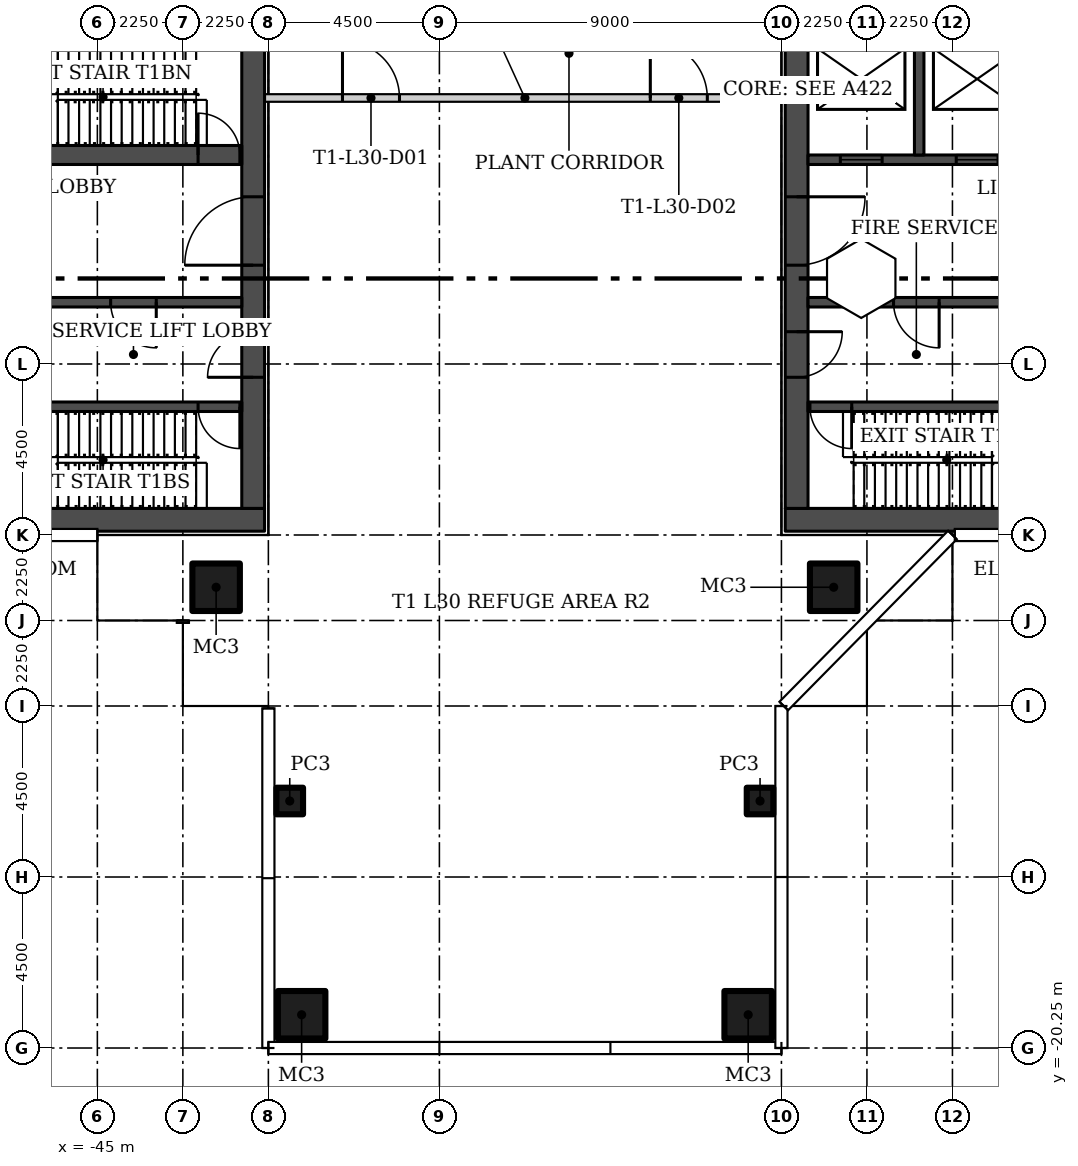
"""IFC4 building model, lengths in metres.
Left out: names, types, materials, properties, quantities, classifications, styles, units other than length and angle.
Written with IfcOpenShell. Run it as: python <this file> out.ifc"""

import sys

from ifc_helpers import new_model, si_unit, direction, frame, frame_2d, origin, origin_2d, place, context, subcontext, project, spatial, rectangle, hollow_rectangle, extrude, element, fill, save


model = new_model("IFC4")
c1 = context("Model", 3, precision=1e-05, world=origin(), true_north=direction((0.0, 1.0)))
c2 = subcontext(c1, "Body", "Model", "MODEL_VIEW")
j1 = project(units=[si_unit("LENGTHUNIT", "METRE"), si_unit("PLANEANGLEUNIT", "RADIAN")], contexts=[c1])
p1 = place(None, origin())
s1 = spatial("IfcSite", under=j1, at=p1, CompositionType="ELEMENT")
p2 = place(p1, origin())
s2 = spatial("IfcBuilding", under=s1, at=p2, CompositionType="ELEMENT")
p3 = place(p2, frame((0.0, 0.0, 128.7)))
s3 = spatial("IfcBuildingStorey", under=s2, at=p3, CompositionType="ELEMENT", Elevation=128.7)
for number, where in (
    (1, (-25.625, -8.125, 0.0)),
    (2, (-41.875, -8.125, 0.0)),
):
    element("IfcColumn", number, at=place(p3, frame(where)), inside=s3, PredefinedType="COLUMN", context=c2, shape_type="SweptSolid", body=[
        extrude(hollow_rectangle(XDim=1.25, YDim=1.25, WallThickness=0.05, at=origin_2d()), origin(), (0.0, 0.0, 1.0), 4.4),
    ])
p4 = place(p3, frame((-39.938, -13.75, 0.0)))
e3 = element("IfcColumn", 3, at=p4, inside=s3, PredefinedType="COLUMN", context=c2, shape_type="SweptSolid", body=[
    extrude(hollow_rectangle(XDim=0.7, YDim=0.7, WallThickness=0.025, at=origin_2d()), origin(), (0.0, 0.0, 1.0), 4.4),
])
p5 = place(p3, frame((-39.625, -19.375, 0.0)))
e4 = element("IfcColumn", 4, at=p5, inside=s3, PredefinedType="COLUMN", context=c2, shape_type="SweptSolid", body=[
    extrude(hollow_rectangle(XDim=1.25, YDim=1.25, WallThickness=0.05, at=origin_2d()), origin(), (0.0, 0.0, 1.0), 4.4),
])
p6 = place(p3, frame((-27.562, -13.75, 0.0)))
e5 = element("IfcColumn", 5, at=p6, inside=s3, PredefinedType="COLUMN", context=c2, shape_type="SweptSolid", body=[
    extrude(hollow_rectangle(XDim=0.7, YDim=0.7, WallThickness=0.025, at=origin_2d()), origin(), (0.0, 0.0, 1.0), 4.4),
])
p7 = place(p3, frame((-27.875, -19.375, 0.0)))
e6 = element("IfcColumn", 6, at=p7, inside=s3, PredefinedType="COLUMN", context=c2, shape_type="SweptSolid", body=[
    extrude(hollow_rectangle(XDim=1.25, YDim=1.25, WallThickness=0.05, at=origin_2d()), origin(), (0.0, 0.0, 1.0), 4.4),
])
p8 = place(p3, frame((-40.6, 4.75, 0.0)))
e7 = element("IfcWall", 7, at=p8, inside=s3, PredefinedType="PARTITIONING", context=c2, shape_type="SweptSolid", body=[
    extrude(rectangle(XDim=13.7, YDim=0.2, at=frame_2d((6.85, 0.0))), origin(), (0.0, 0.0, 1.0), 4.4),
])
p9 = place(p8, frame((2.05, 0.0, 0.0)))
e8 = element("IfcOpeningElement", 8, at=p9, cuts=e7, PredefinedType="OPENING", context=c2, shape_type="SweptSolid", body=[
    extrude(rectangle(XDim=1.5, YDim=2.4, at=frame_2d((0.75, 1.2))), frame((0.0, 0.11, 0.0), z_axis=(0.0, -1.0, 0.0), x_axis=(1.0, 0.0, 0.0)), (0.0, 0.0, 1.0), 0.22),
])
p10 = place(p8, frame((10.15, 0.0, 0.0)))
e9 = element("IfcOpeningElement", 9, at=p10, cuts=e7, PredefinedType="OPENING", context=c2, shape_type="SweptSolid", body=[
    extrude(rectangle(XDim=1.5, YDim=2.4, at=frame_2d((0.75, 1.2))), frame((0.0, 0.11, 0.0), z_axis=(0.0, -1.0, 0.0), x_axis=(1.0, 0.0, 0.0)), (0.0, 0.0, 1.0), 0.22),
])
p11 = place(p3, frame((-26.9, -6.35, 0.0)))
e10 = element("IfcWall", 10, at=p11, inside=s3, PredefinedType="SHEAR", context=c2, shape_type="SweptSolid", body=[
    extrude(rectangle(XDim=13.3, YDim=0.6, at=frame_2d((6.65, 0.0))), origin(), (0.0, 0.0, 1.0), 4.4),
])
p12 = place(p3, frame((-26.6, 6.05, 0.0), z_axis=(0.0, 0.0, 1.0), x_axis=(0.0, -1.0, 0.0)))
e11 = element("IfcWall", 11, at=p12, inside=s3, PredefinedType="SHEAR", context=c2, shape_type="SweptSolid", body=[
    extrude(rectangle(XDim=12.1, YDim=0.6, at=frame_2d((6.05, 0.0))), origin(), (0.0, 0.0, 1.0), 4.4),
])
p13 = place(p12, frame((7.45, 0.0, 0.0)))
e12 = element("IfcOpeningElement", 12, at=p13, cuts=e11, PredefinedType="OPENING", context=c2, shape_type="SweptSolid", body=[
    extrude(rectangle(XDim=1.2, YDim=2.1, at=frame_2d((0.6, 1.05))), frame((0.0, 0.31, 0.0), z_axis=(0.0, -1.0, 0.0), x_axis=(1.0, 0.0, 0.0)), (0.0, 0.0, 1.0), 0.62),
])
p14 = place(p12, frame((3.9, 0.0, 0.0)))
e13 = element("IfcOpeningElement", 13, at=p14, cuts=e11, PredefinedType="OPENING", context=c2, shape_type="SweptSolid", body=[
    extrude(rectangle(XDim=1.8, YDim=2.4, at=frame_2d((0.9, 1.2))), frame((0.0, 0.31, 0.0), z_axis=(0.0, -1.0, 0.0), x_axis=(1.0, 0.0, 0.0)), (0.0, 0.0, 1.0), 0.62),
])
p15 = place(p3, frame((-14.2, -3.375, 0.0), z_axis=(0.0, 0.0, 1.0), x_axis=(-1.0, 0.0, 0.0)))
e14 = element("IfcWall", 14, at=p15, inside=s3, PredefinedType="SHEAR", context=c2, shape_type="SweptSolid", body=[
    extrude(rectangle(XDim=12.1, YDim=0.25, at=frame_2d((6.05, 0.0))), origin(), (0.0, 0.0, 1.0), 4.4),
])
p16 = place(p15, frame((10.95, 0.0, 0.0)))
e15 = element("IfcOpeningElement", 15, at=p16, cuts=e14, PredefinedType="OPENING", context=c2, shape_type="SweptSolid", body=[
    extrude(rectangle(XDim=1.1, YDim=2.1, at=frame_2d((0.55, 1.05))), frame((0.0, 0.135, 0.0), z_axis=(0.0, -1.0, 0.0), x_axis=(1.0, 0.0, 0.0)), (0.0, 0.0, 1.0), 0.27),
])
p17 = place(p3, frame((-14.2, -0.625, 0.0), z_axis=(0.0, 0.0, 1.0), x_axis=(-1.0, 0.0, 0.0)))
e16 = element("IfcWall", 16, at=p17, inside=s3, PredefinedType="SHEAR", context=c2, shape_type="SweptSolid", body=[
    extrude(rectangle(XDim=12.1, YDim=0.25, at=frame_2d((6.05, 0.0))), origin(), (0.0, 0.0, 1.0), 4.4),
])
p18 = place(p17, frame((8.65, 0.0, 0.0)))
e17 = element("IfcOpeningElement", 17, at=p18, cuts=e16, PredefinedType="OPENING", context=c2, shape_type="SweptSolid", body=[
    extrude(rectangle(XDim=1.2, YDim=2.1, at=frame_2d((0.6, 1.05))), frame((0.0, 0.135, 0.0), z_axis=(0.0, -1.0, 0.0), x_axis=(1.0, 0.0, 0.0)), (0.0, 0.0, 1.0), 0.27),
])
p19 = place(p17, frame((2.0, 0.0, 0.0)))
e18 = element("IfcOpeningElement", 18, at=p19, cuts=e16, PredefinedType="OPENING", context=c2, shape_type="SweptSolid", body=[
    extrude(rectangle(XDim=0.9, YDim=2.1, at=frame_2d((0.45, 1.05))), frame((0.0, 0.135, 0.0), z_axis=(0.0, -1.0, 0.0), x_axis=(1.0, 0.0, 0.0)), (0.0, 0.0, 1.0), 0.27),
])
p20 = place(p17, frame((0.375, 0.0, 0.0)))
e19 = element("IfcOpeningElement", 19, at=p20, cuts=e16, PredefinedType="OPENING", context=c2, shape_type="SweptSolid", body=[
    extrude(rectangle(XDim=0.9, YDim=2.1, at=frame_2d((0.45, 1.05))), frame((0.0, 0.135, 0.0), z_axis=(0.0, -1.0, 0.0), x_axis=(1.0, 0.0, 0.0)), (0.0, 0.0, 1.0), 0.27),
])
p21 = place(p3, frame((-26.3, 3.125, 0.0)))
e20 = element("IfcWall", 20, at=p21, inside=s3, PredefinedType="SHEAR", context=c2, shape_type="SweptSolid", body=[
    extrude(rectangle(XDim=12.1, YDim=0.25, at=frame_2d((6.05, 0.0))), origin(), (0.0, 0.0, 1.0), 4.4),
])
p22 = place(p21, frame((0.85, 0.0, 0.0)))
e21 = element("IfcOpeningElement", 21, at=p22, cuts=e20, PredefinedType="OPENING", context=c2, shape_type="SweptSolid", body=[
    extrude(rectangle(XDim=1.1, YDim=2.1, at=frame_2d((0.55, 1.05))), frame((0.0, 0.135, 0.0), z_axis=(0.0, -1.0, 0.0), x_axis=(1.0, 0.0, 0.0)), (0.0, 0.0, 1.0), 0.27),
])
p23 = place(p21, frame((3.9, 0.0, 0.0)))
e22 = element("IfcOpeningElement", 22, at=p23, cuts=e20, PredefinedType="OPENING", context=c2, shape_type="SweptSolid", body=[
    extrude(rectangle(XDim=1.1, YDim=2.1, at=frame_2d((0.55, 1.05))), frame((0.0, 0.135, 0.0), z_axis=(0.0, -1.0, 0.0), x_axis=(1.0, 0.0, 0.0)), (0.0, 0.0, 1.0), 0.27),
])
p24 = place(p3, frame((-23.375, 3.25, 0.0), z_axis=(0.0, 0.0, 1.0), x_axis=(0.0, 1.0, 0.0)))
e23 = element("IfcWall", 23, at=p24, inside=s3, PredefinedType="SHEAR", context=c2, shape_type="SweptSolid", body=[
    extrude(rectangle(XDim=2.8, YDim=0.25, at=frame_2d((1.4, 0.0))), origin(), (0.0, 0.0, 1.0), 4.4),
])
p25 = place(p3, frame((-40.6, -6.35, 0.0), z_axis=(0.0, 0.0, 1.0), x_axis=(-1.0, 0.0, 0.0)))
e24 = element("IfcWall", 24, at=p25, inside=s3, PredefinedType="SHEAR", context=c2, shape_type="SweptSolid", body=[
    extrude(rectangle(XDim=13.3, YDim=0.6, at=frame_2d((6.65, 0.0))), origin(), (0.0, 0.0, 1.0), 4.4),
])
p26 = place(p3, frame((-40.9, -6.05, 0.0), z_axis=(0.0, 0.0, 1.0), x_axis=(0.0, 1.0, 0.0)))
e25 = element("IfcWall", 25, at=p26, inside=s3, PredefinedType="SHEAR", context=c2, shape_type="SweptSolid", body=[
    extrude(rectangle(XDim=12.1, YDim=0.6, at=frame_2d((6.05, 0.0))), origin(), (0.0, 0.0, 1.0), 4.4),
])
p27 = place(p26, frame((3.45, 0.0, 0.0)))
e26 = element("IfcOpeningElement", 26, at=p27, cuts=e25, PredefinedType="OPENING", context=c2, shape_type="SweptSolid", body=[
    extrude(rectangle(XDim=1.2, YDim=2.1, at=frame_2d((0.6, 1.05))), frame((0.0, 0.31, 0.0), z_axis=(0.0, -1.0, 0.0), x_axis=(1.0, 0.0, 0.0)), (0.0, 0.0, 1.0), 0.62),
])
p28 = place(p26, frame((6.4, 0.0, 0.0)))
e27 = element("IfcOpeningElement", 27, at=p28, cuts=e25, PredefinedType="OPENING", context=c2, shape_type="SweptSolid", body=[
    extrude(rectangle(XDim=1.8, YDim=2.4, at=frame_2d((0.9, 1.2))), frame((0.0, 0.31, 0.0), z_axis=(0.0, -1.0, 0.0), x_axis=(1.0, 0.0, 0.0)), (0.0, 0.0, 1.0), 0.62),
])
p29 = place(p3, frame((-41.2, -3.375, 0.0), z_axis=(0.0, 0.0, 1.0), x_axis=(-1.0, 0.0, 0.0)))
e28 = element("IfcWall", 28, at=p29, inside=s3, PredefinedType="SHEAR", context=c2, shape_type="SweptSolid", body=[
    extrude(rectangle(XDim=12.1, YDim=0.25, at=frame_2d((6.05, 0.0))), origin(), (0.0, 0.0, 1.0), 4.4),
])
p30 = place(p29, frame((0.05, 0.0, 0.0)))
e29 = element("IfcOpeningElement", 29, at=p30, cuts=e28, PredefinedType="OPENING", context=c2, shape_type="SweptSolid", body=[
    extrude(rectangle(XDim=1.1, YDim=2.1, at=frame_2d((0.55, 1.05))), frame((0.0, 0.135, 0.0), z_axis=(0.0, -1.0, 0.0), x_axis=(1.0, 0.0, 0.0)), (0.0, 0.0, 1.0), 0.27),
])
p31 = place(p3, frame((-41.2, -0.625, 0.0), z_axis=(0.0, 0.0, 1.0), x_axis=(-1.0, 0.0, 0.0)))
e30 = element("IfcWall", 30, at=p31, inside=s3, PredefinedType="SHEAR", context=c2, shape_type="SweptSolid", body=[
    extrude(rectangle(XDim=12.1, YDim=0.25, at=frame_2d((6.05, 0.0))), origin(), (0.0, 0.0, 1.0), 4.4),
])
p32 = place(p31, frame((2.25, 0.0, 0.0)))
e31 = element("IfcOpeningElement", 31, at=p32, cuts=e30, PredefinedType="OPENING", context=c2, shape_type="SweptSolid", body=[
    extrude(rectangle(XDim=1.2, YDim=2.1, at=frame_2d((0.6, 1.05))), frame((0.0, 0.135, 0.0), z_axis=(0.0, -1.0, 0.0), x_axis=(1.0, 0.0, 0.0)), (0.0, 0.0, 1.0), 0.27),
])
p33 = place(p31, frame((9.05, 0.0, 0.0)))
e32 = element("IfcOpeningElement", 32, at=p33, cuts=e30, PredefinedType="OPENING", context=c2, shape_type="SweptSolid", body=[
    extrude(rectangle(XDim=0.9, YDim=2.1, at=frame_2d((0.45, 1.05))), frame((0.0, 0.135, 0.0), z_axis=(0.0, -1.0, 0.0), x_axis=(1.0, 0.0, 0.0)), (0.0, 0.0, 1.0), 0.27),
])
p34 = place(p31, frame((10.675, 0.0, 0.0)))
e33 = element("IfcOpeningElement", 33, at=p34, cuts=e30, PredefinedType="OPENING", context=c2, shape_type="SweptSolid", body=[
    extrude(rectangle(XDim=0.9, YDim=2.1, at=frame_2d((0.45, 1.05))), frame((0.0, 0.135, 0.0), z_axis=(0.0, -1.0, 0.0), x_axis=(1.0, 0.0, 0.0)), (0.0, 0.0, 1.0), 0.27),
])
p35 = place(p3, frame((-48.5, 3.25, 0.0)))
e34 = element("IfcWall", 34, at=p35, inside=s3, PredefinedType="SHEAR", context=c2, shape_type="SweptSolid", body=[
    extrude(rectangle(XDim=7.3, YDim=0.5, at=frame_2d((3.65, 0.0))), origin(), (0.0, 0.0, 1.0), 4.4),
])
p36 = place(p35, frame((6.15, 0.0, 0.0)))
e35 = element("IfcOpeningElement", 35, at=p36, cuts=e34, PredefinedType="OPENING", context=c2, shape_type="SweptSolid", body=[
    extrude(rectangle(XDim=1.1, YDim=2.1, at=frame_2d((0.55, 1.05))), frame((0.0, 0.26, 0.0), z_axis=(0.0, -1.0, 0.0), x_axis=(1.0, 0.0, 0.0)), (0.0, 0.0, 1.0), 0.52),
])
p37 = place(p9, origin())
e36 = element("IfcDoor", 36, at=p37, inside=s3, OperationType="DOUBLE_DOOR_SINGLE_SWING", PredefinedType="DOOR", context=c2, shape_type="SweptSolid", body=[
    extrude(rectangle(XDim=1.5, YDim=2.4, at=frame_2d((0.75, 1.2))), frame((0.0, 0.025, 0.0), z_axis=(0.0, -1.0, 0.0), x_axis=(1.0, 0.0, 0.0)), (0.0, 0.0, 1.0), 0.05),
])
fill(e8, e36)
p38 = place(p10, origin())
e37 = element("IfcDoor", 37, at=p38, inside=s3, OperationType="DOUBLE_DOOR_SINGLE_SWING", PredefinedType="DOOR", context=c2, shape_type="SweptSolid", body=[
    extrude(rectangle(XDim=1.5, YDim=2.4, at=frame_2d((0.75, 1.2))), frame((0.0, 0.025, 0.0), z_axis=(0.0, -1.0, 0.0), x_axis=(1.0, 0.0, 0.0)), (0.0, 0.0, 1.0), 0.05),
])
fill(e9, e37)
p39 = place(p13, origin())
e38 = element("IfcDoor", 38, at=p39, inside=s3, OperationType="SINGLE_SWING_RIGHT", PredefinedType="DOOR", context=c2, shape_type="SweptSolid", body=[
    extrude(rectangle(XDim=1.2, YDim=2.1, at=frame_2d((0.6, 1.05))), frame((0.0, 0.025, 0.0), z_axis=(0.0, -1.0, 0.0), x_axis=(1.0, 0.0, 0.0)), (0.0, 0.0, 1.0), 0.05),
])
fill(e12, e38)
p40 = place(p14, origin())
e39 = element("IfcDoor", 39, at=p40, inside=s3, OperationType="DOUBLE_DOOR_SINGLE_SWING", PredefinedType="DOOR", context=c2, shape_type="SweptSolid", body=[
    extrude(rectangle(XDim=1.8, YDim=2.4, at=frame_2d((0.9, 1.2))), frame((0.0, 0.025, 0.0), z_axis=(0.0, -1.0, 0.0), x_axis=(1.0, 0.0, 0.0)), (0.0, 0.0, 1.0), 0.05),
])
fill(e13, e39)
p41 = place(p16, origin())
e40 = element("IfcDoor", 40, at=p41, inside=s3, OperationType="SINGLE_SWING_RIGHT", PredefinedType="DOOR", context=c2, shape_type="SweptSolid", body=[
    extrude(rectangle(XDim=1.1, YDim=2.1, at=frame_2d((0.55, 1.05))), frame((0.0, 0.025, 0.0), z_axis=(0.0, -1.0, 0.0), x_axis=(1.0, 0.0, 0.0)), (0.0, 0.0, 1.0), 0.05),
])
fill(e15, e40)
p42 = place(p18, origin())
e41 = element("IfcDoor", 41, at=p42, inside=s3, OperationType="SINGLE_SWING_RIGHT", PredefinedType="DOOR", context=c2, shape_type="SweptSolid", body=[
    extrude(rectangle(XDim=1.2, YDim=2.1, at=frame_2d((0.6, 1.05))), frame((0.0, 0.025, 0.0), z_axis=(0.0, -1.0, 0.0), x_axis=(1.0, 0.0, 0.0)), (0.0, 0.0, 1.0), 0.05),
])
fill(e17, e41)
p43 = place(p22, origin())
e42 = element("IfcDoor", 42, at=p43, inside=s3, OperationType="SLIDING_TO_LEFT", PredefinedType="DOOR", context=c2, shape_type="SweptSolid", body=[
    extrude(rectangle(XDim=1.1, YDim=2.1, at=frame_2d((0.55, 1.05))), frame((0.0, 0.025, 0.0), z_axis=(0.0, -1.0, 0.0), x_axis=(1.0, 0.0, 0.0)), (0.0, 0.0, 1.0), 0.05),
])
fill(e21, e42)
p44 = place(p23, origin())
e43 = element("IfcDoor", 43, at=p44, inside=s3, OperationType="SLIDING_TO_LEFT", PredefinedType="DOOR", context=c2, shape_type="SweptSolid", body=[
    extrude(rectangle(XDim=1.1, YDim=2.1, at=frame_2d((0.55, 1.05))), frame((0.0, 0.025, 0.0), z_axis=(0.0, -1.0, 0.0), x_axis=(1.0, 0.0, 0.0)), (0.0, 0.0, 1.0), 0.05),
])
fill(e22, e43)
p45 = place(p27, origin())
e44 = element("IfcDoor", 44, at=p45, inside=s3, OperationType="SINGLE_SWING_LEFT", PredefinedType="DOOR", context=c2, shape_type="SweptSolid", body=[
    extrude(rectangle(XDim=1.2, YDim=2.1, at=frame_2d((0.6, 1.05))), frame((0.0, 0.025, 0.0), z_axis=(0.0, -1.0, 0.0), x_axis=(1.0, 0.0, 0.0)), (0.0, 0.0, 1.0), 0.05),
])
fill(e26, e44)
p46 = place(p28, origin())
e45 = element("IfcDoor", 45, at=p46, inside=s3, OperationType="DOUBLE_DOOR_SINGLE_SWING", PredefinedType="DOOR", context=c2, shape_type="SweptSolid", body=[
    extrude(rectangle(XDim=1.8, YDim=2.4, at=frame_2d((0.9, 1.2))), frame((0.0, 0.025, 0.0), z_axis=(0.0, -1.0, 0.0), x_axis=(1.0, 0.0, 0.0)), (0.0, 0.0, 1.0), 0.05),
])
fill(e27, e45)
p47 = place(p30, origin())
e46 = element("IfcDoor", 46, at=p47, inside=s3, OperationType="SINGLE_SWING_LEFT", PredefinedType="DOOR", context=c2, shape_type="SweptSolid", body=[
    extrude(rectangle(XDim=1.1, YDim=2.1, at=frame_2d((0.55, 1.05))), frame((0.0, 0.025, 0.0), z_axis=(0.0, -1.0, 0.0), x_axis=(1.0, 0.0, 0.0)), (0.0, 0.0, 1.0), 0.05),
])
fill(e29, e46)
p48 = place(p32, origin())
e47 = element("IfcDoor", 47, at=p48, inside=s3, OperationType="SINGLE_SWING_LEFT", PredefinedType="DOOR", context=c2, shape_type="SweptSolid", body=[
    extrude(rectangle(XDim=1.2, YDim=2.1, at=frame_2d((0.6, 1.05))), frame((0.0, 0.025, 0.0), z_axis=(0.0, -1.0, 0.0), x_axis=(1.0, 0.0, 0.0)), (0.0, 0.0, 1.0), 0.05),
])
fill(e31, e47)
p49 = place(p36, origin())
e48 = element("IfcDoor", 48, at=p49, inside=s3, OperationType="SINGLE_SWING_RIGHT", PredefinedType="DOOR", context=c2, shape_type="SweptSolid", body=[
    extrude(rectangle(XDim=1.1, YDim=2.1, at=frame_2d((0.55, 1.05))), frame((0.0, 0.025, 0.0), z_axis=(0.0, -1.0, 0.0), x_axis=(1.0, 0.0, 0.0)), (0.0, 0.0, 1.0), 0.05),
])
fill(e35, e48)
save(model, sys.argv[1])
